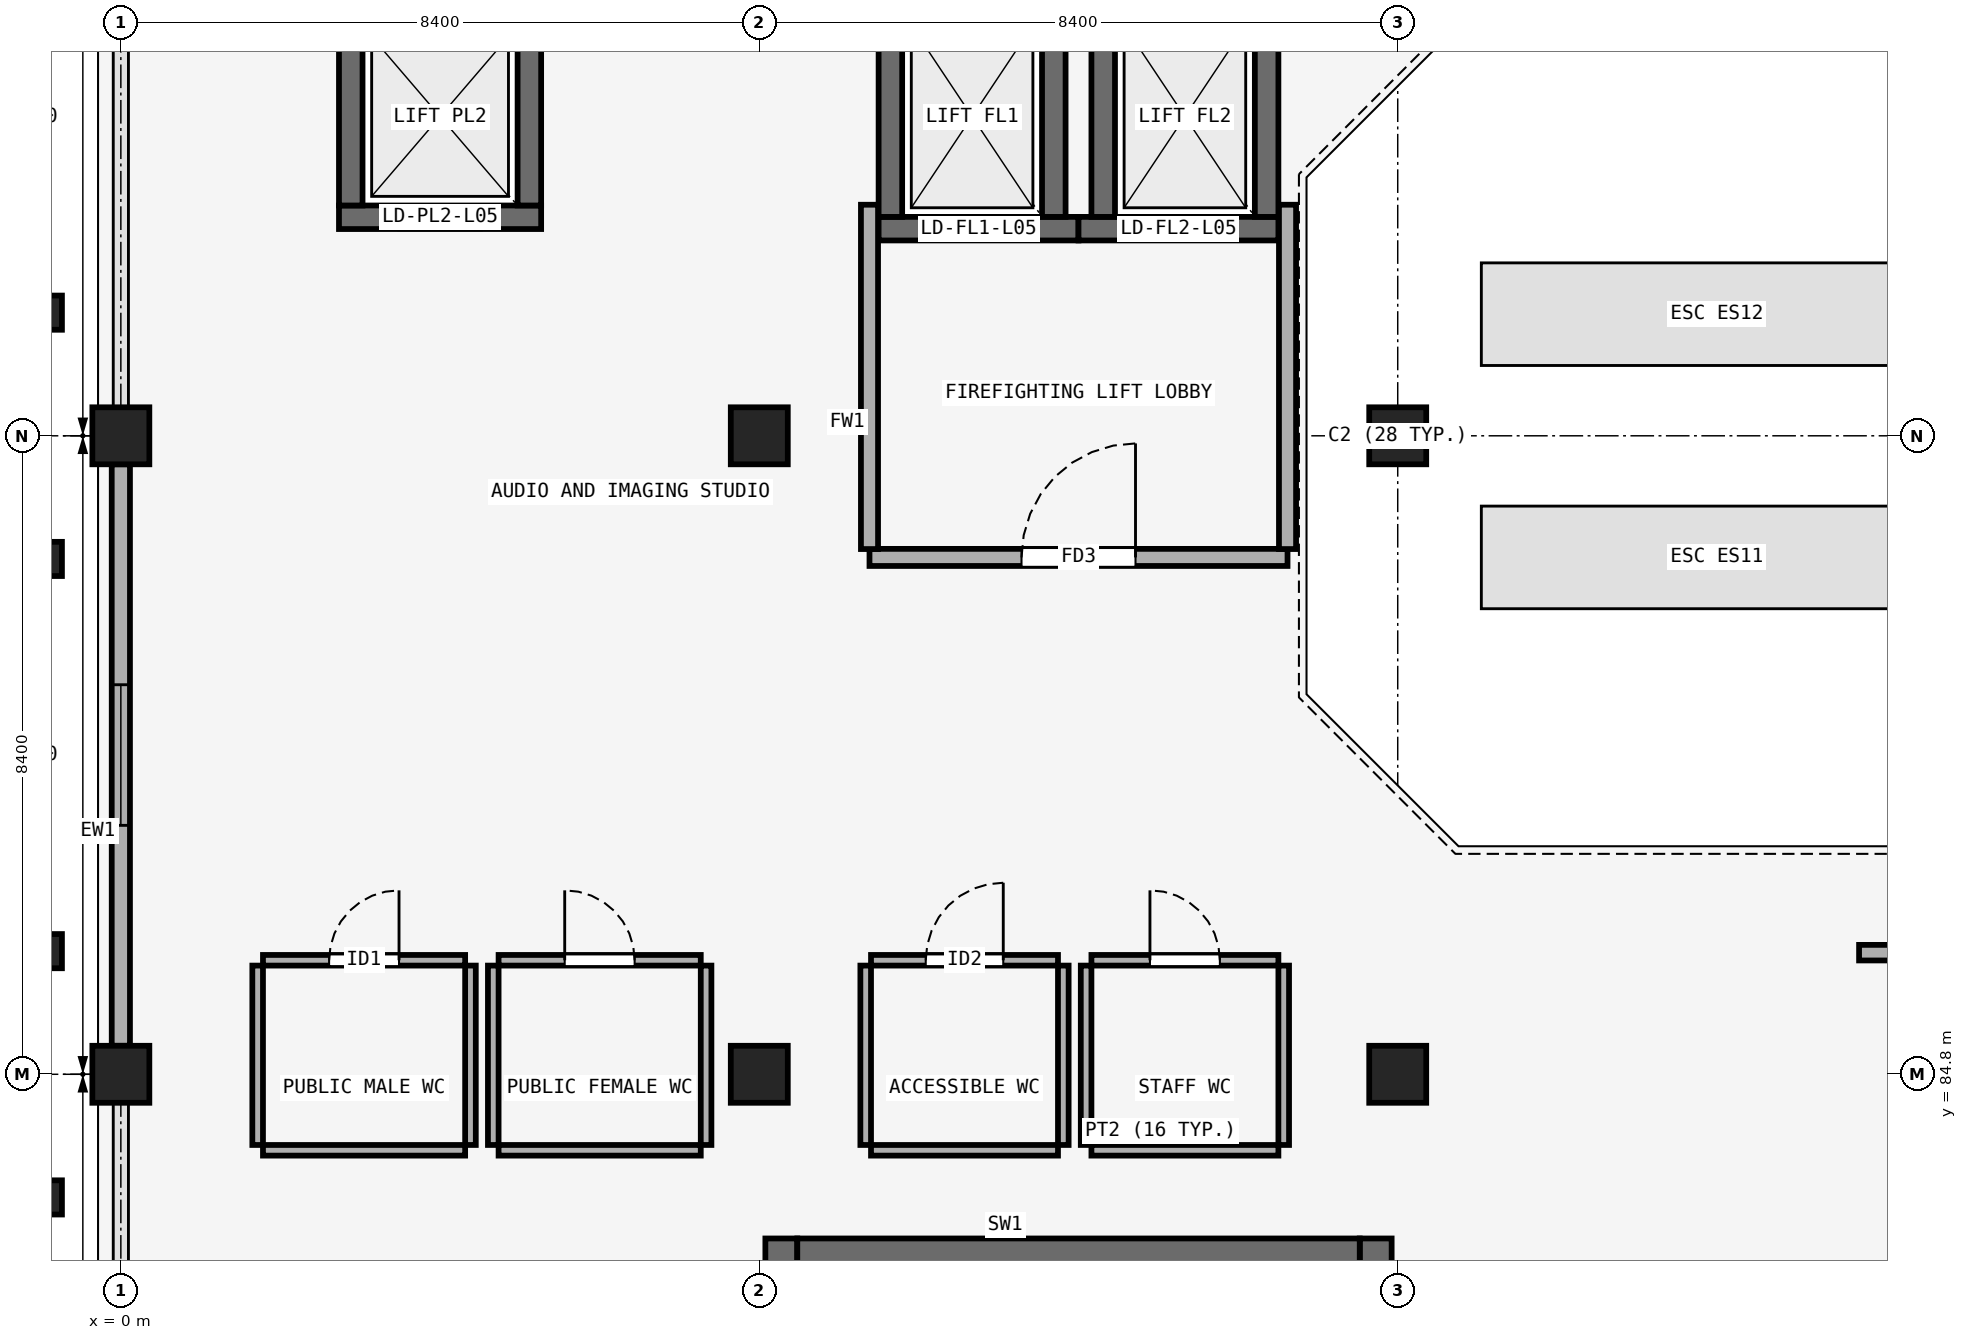
"""IFC4 building model, lengths in metres.
Left out: names, types, materials, properties, quantities, classifications, styles, units other than length and angle.
Written with IfcOpenShell. Run it as: python <this file> out.ifc"""

import sys

from ifc_helpers import new_model, si_unit, direction, frame, frame_2d, origin, origin_2d, place, context, subcontext, project, spatial, rectangle, extrude, element, fill, save


model = new_model("IFC4")
c1 = context("Model", 3, precision=1e-05, world=origin(), true_north=direction((0.0, 1.0)))
c2 = subcontext(c1, "Body", "Model", "MODEL_VIEW")
j1 = project(units=[si_unit("LENGTHUNIT", "METRE"), si_unit("PLANEANGLEUNIT", "RADIAN")], contexts=[c1])
p1 = place(None, origin())
s1 = spatial("IfcSite", under=j1, at=p1, CompositionType="ELEMENT")
p2 = place(p1, origin())
s2 = spatial("IfcBuilding", under=s1, at=p2, CompositionType="ELEMENT")
p3 = place(p2, frame((0.0, 0.0, 23.4)))
s3 = spatial("IfcBuildingStorey", under=s2, at=p3, CompositionType="ELEMENT", Elevation=23.4)
for number, where, z_axis, x_axis in (
    (1, (0.0, 84.8, 0.0), (0.0, 0.0, 1.0), (1.0, 0.0, 0.0)),
    (2, (8.4, 84.8, 0.0), (0.0, 0.0, 1.0), (1.0, 0.0, 0.0)),
    (3, (16.8, 84.8, 0.0), (0.0, 0.0, 1.0), (1.0, 0.0, 0.0)),
    (4, (0.0, 93.2, 0.0), (0.0, 0.0, 1.0), (1.0, 0.0, 0.0)),
    (5, (8.4, 93.2, 0.0), (0.0, 0.0, 1.0), (1.0, 0.0, 0.0)),
    (6, (16.8, 93.2, 0.0), (0.0, 0.0, 1.0), (1.0, 0.0, 0.0)),
):
    element("IfcColumn", number, at=place(p3, frame(where, z_axis=z_axis, x_axis=x_axis)), inside=s3, PredefinedType="COLUMN", context=c2, shape_type="SweptSolid", body=[
        extrude(rectangle(XDim=0.75, YDim=0.75, at=origin_2d()), origin(), (0.0, 0.0, 1.0), 4.5),
    ])
for number, where, z_axis, x_axis in (
    (7, (-1.05, 83.18, 0.0), (0.0, 0.0, 1.0), (0.0, 1.0, 0.0)),
    (8, (-1.05, 86.42, 0.0), (0.0, 0.0, 1.0), (0.0, 1.0, 0.0)),
    (9, (-1.05, 91.58, 0.0), (0.0, 0.0, 1.0), (0.0, 1.0, 0.0)),
    (10, (-1.05, 94.82, 0.0), (0.0, 0.0, 1.0), (0.0, 1.0, 0.0)),
):
    element("IfcColumn", number, at=place(p3, frame(where, z_axis=z_axis, x_axis=x_axis)), inside=s3, PredefinedType="PILASTER", context=c2, shape_type="SweptSolid", body=[
        extrude(rectangle(XDim=0.45, YDim=0.55, at=origin_2d()), origin(), (0.0, 0.0, 1.0), 4.5),
    ])
p4 = place(p3, frame((0.0, 85.175, 0.0), z_axis=(0.0, 0.0, 1.0), x_axis=(0.0, 1.0, 0.0)))
e11 = element("IfcWall", 11, at=p4, inside=s3, PredefinedType="SOLIDWALL", context=c2, shape_type="SweptSolid", body=[
    extrude(rectangle(XDim=7.65, YDim=0.24, at=frame_2d((3.825, 0.0))), origin(), (0.0, 0.0, 1.0), 3.45),
])
p5 = place(p4, frame((2.9, 0.0, 0.95)))
e12 = element("IfcOpeningElement", 12, at=p5, cuts=e11, PredefinedType="OPENING", context=c2, shape_type="SweptSolid", body=[
    extrude(rectangle(XDim=1.85, YDim=1.85, at=frame_2d((0.925, 0.925))), frame((0.0, 0.13, 0.0), z_axis=(0.0, -1.0, 0.0), x_axis=(1.0, 0.0, 0.0)), (0.0, 0.0, 1.0), 0.26),
])
p6 = place(p3, frame((8.69, 82.64, 0.0), z_axis=(0.0, 0.0, 1.0), x_axis=(0.0, -1.0, 0.0)))
e13 = element("IfcWall", 13, at=p6, inside=s3, PredefinedType="SHEAR", context=c2, shape_type="SweptSolid", body=[
    extrude(rectangle(XDim=4.08, YDim=0.42, at=frame_2d((2.04, 0.0))), origin(), (0.0, 0.0, 1.0), 4.2),
])
p7 = place(p6, frame((1.315, 0.0, 0.0)))
e14 = element("IfcOpeningElement", 14, at=p7, cuts=e13, PredefinedType="OPENING", context=c2, shape_type="SweptSolid", body=[
    extrude(rectangle(XDim=1.45, YDim=2.2, at=frame_2d((0.725, 1.1))), frame((0.0, 0.22, 0.0), z_axis=(0.0, -1.0, 0.0), x_axis=(1.0, 0.0, 0.0)), (0.0, 0.0, 1.0), 0.44),
])
p8 = place(p3, frame((16.51, 78.56, 0.0), z_axis=(0.0, 0.0, 1.0), x_axis=(0.0, 1.0, 0.0)))
e15 = element("IfcWall", 15, at=p8, inside=s3, PredefinedType="SHEAR", context=c2, shape_type="SweptSolid", body=[
    extrude(rectangle(XDim=4.08, YDim=0.42, at=frame_2d((2.04, 0.0))), origin(), (0.0, 0.0, 1.0), 4.2),
])
p9 = place(p3, frame((8.9, 82.43, 0.0), z_axis=(0.0, 0.0, 1.0), x_axis=(1.0, 0.0, 0.0)))
e16 = element("IfcWall", 16, at=p9, inside=s3, PredefinedType="SHEAR", context=c2, shape_type="SweptSolid", body=[
    extrude(rectangle(XDim=7.4, YDim=0.42, at=frame_2d((3.7, 0.0))), origin(), (0.0, 0.0, 1.0), 4.2),
])
p10 = place(p3, frame((9.97, 95.925, 0.0), z_axis=(0.0, 0.0, 1.0), x_axis=(1.0, 0.0, 0.0)))
e17 = element("IfcWall", 17, at=p10, inside=s3, PredefinedType="SHEAR", context=c2, shape_type="SweptSolid", body=[
    extrude(rectangle(XDim=2.63, YDim=0.31, at=frame_2d((1.315, 0.0))), origin(), (0.0, 0.0, 1.0), 4.2),
])
p11 = place(p10, frame((0.715, 0.0, 0.0)))
e18 = element("IfcOpeningElement", 18, at=p11, cuts=e17, PredefinedType="OPENING", context=c2, shape_type="SweptSolid", body=[
    extrude(rectangle(XDim=1.2, YDim=2.25, at=frame_2d((0.6, 1.125))), frame((0.0, 0.165, 0.0), z_axis=(0.0, -1.0, 0.0), x_axis=(1.0, 0.0, 0.0)), (0.0, 0.0, 1.0), 0.33),
])
for number, where, z_axis, x_axis in (
    (19, (10.125, 96.08, 0.0), (0.0, 0.0, 1.0), (0.0, 1.0, 0.0)),
    (20, (12.275, 96.08, 0.0), (0.0, 0.0, 1.0), (0.0, 1.0, 0.0)),
):
    element("IfcWall", number, at=place(p3, frame(where, z_axis=z_axis, x_axis=x_axis)), inside=s3, PredefinedType="SHEAR", context=c2, shape_type="SweptSolid", body=[
        extrude(rectangle(XDim=2.64, YDim=0.31, at=frame_2d((1.32, 0.0))), origin(), (0.0, 0.0, 1.0), 4.2),
    ])
p12 = place(p3, frame((12.6, 95.925, 0.0), z_axis=(0.0, 0.0, 1.0), x_axis=(1.0, 0.0, 0.0)))
e21 = element("IfcWall", 21, at=p12, inside=s3, PredefinedType="SHEAR", context=c2, shape_type="SweptSolid", body=[
    extrude(rectangle(XDim=2.63, YDim=0.31, at=frame_2d((1.315, 0.0))), origin(), (0.0, 0.0, 1.0), 4.2),
])
p13 = place(p12, frame((0.715, 0.0, 0.0)))
e22 = element("IfcOpeningElement", 22, at=p13, cuts=e21, PredefinedType="OPENING", context=c2, shape_type="SweptSolid", body=[
    extrude(rectangle(XDim=1.2, YDim=2.25, at=frame_2d((0.6, 1.125))), frame((0.0, 0.165, 0.0), z_axis=(0.0, -1.0, 0.0), x_axis=(1.0, 0.0, 0.0)), (0.0, 0.0, 1.0), 0.33),
])
for number, where, z_axis, x_axis in (
    (23, (12.925, 96.08, 0.0), (0.0, 0.0, 1.0), (0.0, 1.0, 0.0)),
    (24, (15.075, 96.08, 0.0), (0.0, 0.0, 1.0), (0.0, 1.0, 0.0)),
):
    element("IfcWall", number, at=place(p3, frame(where, z_axis=z_axis, x_axis=x_axis)), inside=s3, PredefinedType="SHEAR", context=c2, shape_type="SweptSolid", body=[
        extrude(rectangle(XDim=2.64, YDim=0.31, at=frame_2d((1.32, 0.0))), origin(), (0.0, 0.0, 1.0), 4.2),
    ])
p14 = place(p3, frame((2.87, 96.075, 0.0), z_axis=(0.0, 0.0, 1.0), x_axis=(1.0, 0.0, 0.0)))
e25 = element("IfcWall", 25, at=p14, inside=s3, PredefinedType="SHEAR", context=c2, shape_type="SweptSolid", body=[
    extrude(rectangle(XDim=2.66, YDim=0.31, at=frame_2d((1.33, 0.0))), origin(), (0.0, 0.0, 1.0), 4.2),
])
p15 = place(p14, frame((0.78, 0.0, 0.0)))
e26 = element("IfcOpeningElement", 26, at=p15, cuts=e25, PredefinedType="OPENING", context=c2, shape_type="SweptSolid", body=[
    extrude(rectangle(XDim=1.1, YDim=2.2, at=frame_2d((0.55, 1.1))), frame((0.0, 0.165, 0.0), z_axis=(0.0, -1.0, 0.0), x_axis=(1.0, 0.0, 0.0)), (0.0, 0.0, 1.0), 0.33),
])
for number, where, z_axis, x_axis in (
    (27, (3.025, 96.23, 0.0), (0.0, 0.0, 1.0), (0.0, 1.0, 0.0)),
    (28, (5.375, 96.23, 0.0), (0.0, 0.0, 1.0), (0.0, 1.0, 0.0)),
):
    element("IfcWall", number, at=place(p3, frame(where, z_axis=z_axis, x_axis=x_axis)), inside=s3, PredefinedType="SHEAR", context=c2, shape_type="SweptSolid", body=[
        extrude(rectangle(XDim=2.34, YDim=0.31, at=frame_2d((1.17, 0.0))), origin(), (0.0, 0.0, 1.0), 4.2),
    ])
p16 = place(p3, frame((9.85, 91.6, 0.0), z_axis=(0.0, 0.0, 1.0), x_axis=(1.0, 0.0, 0.0)))
e29 = element("IfcWall", 29, at=p16, inside=s3, PredefinedType="PARTITIONING", context=c2, shape_type="SweptSolid", body=[
    extrude(rectangle(XDim=5.5, YDim=0.225, at=frame_2d((2.75, 0.0))), origin(), (0.0, 0.0, 1.0), 4.2),
])
p17 = place(p16, frame((2.0, 0.0, 0.0)))
e30 = element("IfcOpeningElement", 30, at=p17, cuts=e29, PredefinedType="OPENING", context=c2, shape_type="SweptSolid", body=[
    extrude(rectangle(XDim=1.5, YDim=2.25, at=frame_2d((0.75, 1.125))), frame((0.0, 0.123, 0.0), z_axis=(0.0, -1.0, 0.0), x_axis=(1.0, 0.0, 0.0)), (0.0, 0.0, 1.0), 0.245),
])
for number, where, z_axis, x_axis in (
    (31, (9.85, 91.71, 0.0), (0.0, 0.0, 1.0), (0.0, 1.0, 0.0)),
    (32, (15.35, 91.71, 0.0), (0.0, 0.0, 1.0), (0.0, 1.0, 0.0)),
):
    element("IfcWall", number, at=place(p3, frame(where, z_axis=z_axis, x_axis=x_axis)), inside=s3, PredefinedType="PARTITIONING", context=c2, shape_type="SweptSolid", body=[
        extrude(rectangle(XDim=4.53, YDim=0.225, at=frame_2d((2.265, 0.0))), origin(), (0.0, 0.0, 1.0), 3.5),
    ])
p18 = place(p3, frame((1.87, 86.3, 0.0), z_axis=(0.0, 0.0, 1.0), x_axis=(1.0, 0.0, 0.0)))
e33 = element("IfcWall", 33, at=p18, inside=s3, PredefinedType="PARTITIONING", context=c2, shape_type="SweptSolid", body=[
    extrude(rectangle(XDim=2.66, YDim=0.14, at=frame_2d((1.33, 0.0))), origin(), (0.0, 0.0, 1.0), 4.2),
])
p19 = place(p18, frame((0.87, 0.0, 0.0)))
e34 = element("IfcOpeningElement", 34, at=p19, cuts=e33, PredefinedType="OPENING", context=c2, shape_type="SweptSolid", body=[
    extrude(rectangle(XDim=0.92, YDim=2.12, at=frame_2d((0.46, 1.06))), frame((0.0, 0.08, 0.0), z_axis=(0.0, -1.0, 0.0), x_axis=(1.0, 0.0, 0.0)), (0.0, 0.0, 1.0), 0.16),
])
p20 = place(p3, frame((1.87, 83.8, 0.0), z_axis=(0.0, 0.0, 1.0), x_axis=(1.0, 0.0, 0.0)))
e35 = element("IfcWall", 35, at=p20, inside=s3, PredefinedType="PARTITIONING", context=c2, shape_type="SweptSolid", body=[
    extrude(rectangle(XDim=2.66, YDim=0.14, at=frame_2d((1.33, 0.0))), origin(), (0.0, 0.0, 1.0), 4.2),
])
for number, where, z_axis, x_axis in (
    (36, (1.8, 83.87, 0.0), (0.0, 0.0, 1.0), (0.0, 1.0, 0.0)),
    (37, (4.6, 83.87, 0.0), (0.0, 0.0, 1.0), (0.0, 1.0, 0.0)),
):
    element("IfcWall", number, at=place(p3, frame(where, z_axis=z_axis, x_axis=x_axis)), inside=s3, PredefinedType="PARTITIONING", context=c2, shape_type="SweptSolid", body=[
        extrude(rectangle(XDim=2.36, YDim=0.14, at=frame_2d((1.18, 0.0))), origin(), (0.0, 0.0, 1.0), 3.45),
    ])
p21 = place(p3, frame((4.97, 86.3, 0.0), z_axis=(0.0, 0.0, 1.0), x_axis=(1.0, 0.0, 0.0)))
e38 = element("IfcWall", 38, at=p21, inside=s3, PredefinedType="PARTITIONING", context=c2, shape_type="SweptSolid", body=[
    extrude(rectangle(XDim=2.66, YDim=0.14, at=frame_2d((1.33, 0.0))), origin(), (0.0, 0.0, 1.0), 4.2),
])
p22 = place(p21, frame((0.87, 0.0, 0.0)))
e39 = element("IfcOpeningElement", 39, at=p22, cuts=e38, PredefinedType="OPENING", context=c2, shape_type="SweptSolid", body=[
    extrude(rectangle(XDim=0.92, YDim=2.12, at=frame_2d((0.46, 1.06))), frame((0.0, 0.08, 0.0), z_axis=(0.0, -1.0, 0.0), x_axis=(1.0, 0.0, 0.0)), (0.0, 0.0, 1.0), 0.16),
])
p23 = place(p3, frame((4.97, 83.8, 0.0), z_axis=(0.0, 0.0, 1.0), x_axis=(1.0, 0.0, 0.0)))
e40 = element("IfcWall", 40, at=p23, inside=s3, PredefinedType="PARTITIONING", context=c2, shape_type="SweptSolid", body=[
    extrude(rectangle(XDim=2.66, YDim=0.14, at=frame_2d((1.33, 0.0))), origin(), (0.0, 0.0, 1.0), 4.2),
])
for number, where, z_axis, x_axis in (
    (41, (4.9, 83.87, 0.0), (0.0, 0.0, 1.0), (0.0, 1.0, 0.0)),
    (42, (7.7, 83.87, 0.0), (0.0, 0.0, 1.0), (0.0, 1.0, 0.0)),
):
    element("IfcWall", number, at=place(p3, frame(where, z_axis=z_axis, x_axis=x_axis)), inside=s3, PredefinedType="PARTITIONING", context=c2, shape_type="SweptSolid", body=[
        extrude(rectangle(XDim=2.36, YDim=0.14, at=frame_2d((1.18, 0.0))), origin(), (0.0, 0.0, 1.0), 3.45),
    ])
p24 = place(p3, frame((9.87, 86.3, 0.0), z_axis=(0.0, 0.0, 1.0), x_axis=(1.0, 0.0, 0.0)))
e43 = element("IfcWall", 43, at=p24, inside=s3, PredefinedType="PARTITIONING", context=c2, shape_type="SweptSolid", body=[
    extrude(rectangle(XDim=2.46, YDim=0.14, at=frame_2d((1.23, 0.0))), origin(), (0.0, 0.0, 1.0), 4.2),
])
p25 = place(p24, frame((0.72, 0.0, 0.0)))
e44 = element("IfcOpeningElement", 44, at=p25, cuts=e43, PredefinedType="OPENING", context=c2, shape_type="SweptSolid", body=[
    extrude(rectangle(XDim=1.02, YDim=2.15, at=frame_2d((0.51, 1.075))), frame((0.0, 0.08, 0.0), z_axis=(0.0, -1.0, 0.0), x_axis=(1.0, 0.0, 0.0)), (0.0, 0.0, 1.0), 0.16),
])
p26 = place(p3, frame((9.87, 83.8, 0.0), z_axis=(0.0, 0.0, 1.0), x_axis=(1.0, 0.0, 0.0)))
e45 = element("IfcWall", 45, at=p26, inside=s3, PredefinedType="PARTITIONING", context=c2, shape_type="SweptSolid", body=[
    extrude(rectangle(XDim=2.46, YDim=0.14, at=frame_2d((1.23, 0.0))), origin(), (0.0, 0.0, 1.0), 4.2),
])
for number, where, z_axis, x_axis in (
    (46, (9.8, 83.87, 0.0), (0.0, 0.0, 1.0), (0.0, 1.0, 0.0)),
    (47, (12.4, 83.87, 0.0), (0.0, 0.0, 1.0), (0.0, 1.0, 0.0)),
):
    element("IfcWall", number, at=place(p3, frame(where, z_axis=z_axis, x_axis=x_axis)), inside=s3, PredefinedType="PARTITIONING", context=c2, shape_type="SweptSolid", body=[
        extrude(rectangle(XDim=2.36, YDim=0.14, at=frame_2d((1.18, 0.0))), origin(), (0.0, 0.0, 1.0), 3.45),
    ])
p27 = place(p3, frame((12.77, 86.3, 0.0), z_axis=(0.0, 0.0, 1.0), x_axis=(1.0, 0.0, 0.0)))
e48 = element("IfcWall", 48, at=p27, inside=s3, PredefinedType="PARTITIONING", context=c2, shape_type="SweptSolid", body=[
    extrude(rectangle(XDim=2.46, YDim=0.14, at=frame_2d((1.23, 0.0))), origin(), (0.0, 0.0, 1.0), 4.2),
])
p28 = place(p27, frame((0.77, 0.0, 0.0)))
e49 = element("IfcOpeningElement", 49, at=p28, cuts=e48, PredefinedType="OPENING", context=c2, shape_type="SweptSolid", body=[
    extrude(rectangle(XDim=0.92, YDim=2.12, at=frame_2d((0.46, 1.06))), frame((0.0, 0.08, 0.0), z_axis=(0.0, -1.0, 0.0), x_axis=(1.0, 0.0, 0.0)), (0.0, 0.0, 1.0), 0.16),
])
p29 = place(p3, frame((12.77, 83.8, 0.0), z_axis=(0.0, 0.0, 1.0), x_axis=(1.0, 0.0, 0.0)))
e50 = element("IfcWall", 50, at=p29, inside=s3, PredefinedType="PARTITIONING", context=c2, shape_type="SweptSolid", body=[
    extrude(rectangle(XDim=2.46, YDim=0.14, at=frame_2d((1.23, 0.0))), origin(), (0.0, 0.0, 1.0), 4.2),
])
for number, where, z_axis, x_axis in (
    (51, (12.7, 83.87, 0.0), (0.0, 0.0, 1.0), (0.0, 1.0, 0.0)),
    (52, (15.3, 83.87, 0.0), (0.0, 0.0, 1.0), (0.0, 1.0, 0.0)),
):
    element("IfcWall", number, at=place(p3, frame(where, z_axis=z_axis, x_axis=x_axis)), inside=s3, PredefinedType="PARTITIONING", context=c2, shape_type="SweptSolid", body=[
        extrude(rectangle(XDim=2.36, YDim=0.14, at=frame_2d((1.18, 0.0))), origin(), (0.0, 0.0, 1.0), 3.45),
    ])
p30 = place(p3, frame((22.87, 86.4, 0.0), z_axis=(0.0, 0.0, 1.0), x_axis=(1.0, 0.0, 0.0)))
e53 = element("IfcWall", 53, at=p30, inside=s3, PredefinedType="PARTITIONING", context=c2, shape_type="SweptSolid", body=[
    extrude(rectangle(XDim=6.21, YDim=0.205, at=frame_2d((3.105, 0.0))), origin(), (0.0, 0.0, 1.0), 4.2),
])
p31 = place(p30, frame((3.025, 0.0, 0.0)))
e54 = element("IfcOpeningElement", 54, at=p31, cuts=e53, PredefinedType="OPENING", context=c2, shape_type="SweptSolid", body=[
    extrude(rectangle(XDim=1.36, YDim=2.34, at=frame_2d((0.68, 1.17))), frame((0.0, 0.113, 0.0), z_axis=(0.0, -1.0, 0.0), x_axis=(1.0, 0.0, 0.0)), (0.0, 0.0, 1.0), 0.225),
])
p32 = place(p5, origin())
e55 = element("IfcWindow", 55, at=p32, inside=s3, PartitioningType="DOUBLE_PANEL_VERTICAL", PredefinedType="WINDOW", context=c2, shape_type="SweptSolid", body=[
    extrude(rectangle(XDim=1.85, YDim=1.85, at=frame_2d((0.925, 0.925))), frame((0.0, 0.03, 0.0), z_axis=(0.0, -1.0, 0.0), x_axis=(1.0, 0.0, 0.0)), (0.0, 0.0, 1.0), 0.06),
])
fill(e12, e55)
p33 = place(p11, origin())
e56 = element("IfcDoor", 56, at=p33, inside=s3, OperationType="SLIDING_TO_LEFT", PredefinedType="DOOR", context=c2, shape_type="SweptSolid", body=[
    extrude(rectangle(XDim=1.2, YDim=2.25, at=frame_2d((0.6, 1.125))), frame((0.0, 0.025, 0.0), z_axis=(0.0, -1.0, 0.0), x_axis=(1.0, 0.0, 0.0)), (0.0, 0.0, 1.0), 0.05),
])
fill(e18, e56)
p34 = place(p13, origin())
e57 = element("IfcDoor", 57, at=p34, inside=s3, OperationType="SLIDING_TO_LEFT", PredefinedType="DOOR", context=c2, shape_type="SweptSolid", body=[
    extrude(rectangle(XDim=1.2, YDim=2.25, at=frame_2d((0.6, 1.125))), frame((0.0, 0.025, 0.0), z_axis=(0.0, -1.0, 0.0), x_axis=(1.0, 0.0, 0.0)), (0.0, 0.0, 1.0), 0.05),
])
fill(e22, e57)
p35 = place(p15, origin())
e58 = element("IfcDoor", 58, at=p35, inside=s3, OperationType="SLIDING_TO_LEFT", PredefinedType="DOOR", context=c2, shape_type="SweptSolid", body=[
    extrude(rectangle(XDim=1.1, YDim=2.2, at=frame_2d((0.55, 1.1))), frame((0.0, 0.025, 0.0), z_axis=(0.0, -1.0, 0.0), x_axis=(1.0, 0.0, 0.0)), (0.0, 0.0, 1.0), 0.05),
])
fill(e26, e58)
p36 = place(p17, origin())
e59 = element("IfcDoor", 59, at=p36, inside=s3, OperationType="SINGLE_SWING_RIGHT", PredefinedType="DOOR", context=c2, shape_type="SweptSolid", body=[
    extrude(rectangle(XDim=1.5, YDim=2.25, at=frame_2d((0.75, 1.125))), frame((0.0, 0.025, 0.0), z_axis=(0.0, -1.0, 0.0), x_axis=(1.0, 0.0, 0.0)), (0.0, 0.0, 1.0), 0.05),
])
fill(e30, e59)
p37 = place(p19, origin())
e60 = element("IfcDoor", 60, at=p37, inside=s3, OperationType="SINGLE_SWING_RIGHT", PredefinedType="DOOR", context=c2, shape_type="SweptSolid", body=[
    extrude(rectangle(XDim=0.92, YDim=2.12, at=frame_2d((0.46, 1.06))), frame((0.0, 0.025, 0.0), z_axis=(0.0, -1.0, 0.0), x_axis=(1.0, 0.0, 0.0)), (0.0, 0.0, 1.0), 0.05),
])
fill(e34, e60)
p38 = place(p22, origin())
e61 = element("IfcDoor", 61, at=p38, inside=s3, OperationType="SINGLE_SWING_LEFT", PredefinedType="DOOR", context=c2, shape_type="SweptSolid", body=[
    extrude(rectangle(XDim=0.92, YDim=2.12, at=frame_2d((0.46, 1.06))), frame((0.0, 0.025, 0.0), z_axis=(0.0, -1.0, 0.0), x_axis=(1.0, 0.0, 0.0)), (0.0, 0.0, 1.0), 0.05),
])
fill(e39, e61)
p39 = place(p25, origin())
e62 = element("IfcDoor", 62, at=p39, inside=s3, OperationType="SINGLE_SWING_RIGHT", PredefinedType="DOOR", context=c2, shape_type="SweptSolid", body=[
    extrude(rectangle(XDim=1.02, YDim=2.15, at=frame_2d((0.51, 1.075))), frame((0.0, 0.025, 0.0), z_axis=(0.0, -1.0, 0.0), x_axis=(1.0, 0.0, 0.0)), (0.0, 0.0, 1.0), 0.05),
])
fill(e44, e62)
p40 = place(p28, origin())
e63 = element("IfcDoor", 63, at=p40, inside=s3, OperationType="SINGLE_SWING_LEFT", PredefinedType="DOOR", context=c2, shape_type="SweptSolid", body=[
    extrude(rectangle(XDim=0.92, YDim=2.12, at=frame_2d((0.46, 1.06))), frame((0.0, 0.025, 0.0), z_axis=(0.0, -1.0, 0.0), x_axis=(1.0, 0.0, 0.0)), (0.0, 0.0, 1.0), 0.05),
])
fill(e49, e63)
save(model, sys.argv[1])
